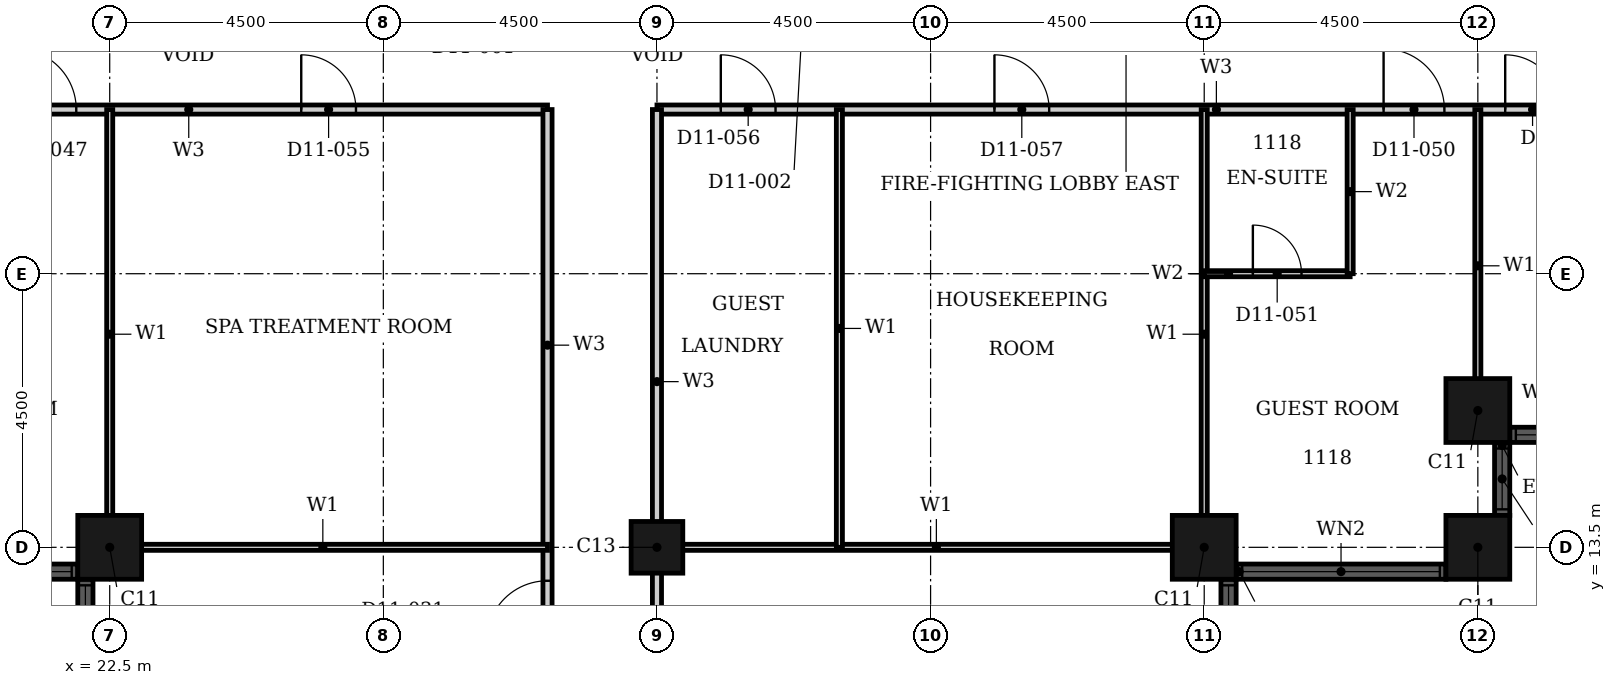
"""IFC4 building model, lengths in metres.
Left out: names, types, materials, properties, quantities, classifications, styles, units other than length and angle.
Written with IfcOpenShell. Run it as: python <this file> out.ifc"""

import sys

from ifc_helpers import new_model, si_unit, direction, frame, frame_2d, origin, origin_2d, place, context, subcontext, project, spatial, rectangle, hollow_rectangle, extrude, element, fill, save


model = new_model("IFC4")
c1 = context("Model", 3, precision=1e-05, world=origin(), true_north=direction((0.0, 1.0)))
c2 = subcontext(c1, "Body", "Model", "MODEL_VIEW")
j1 = project(units=[si_unit("LENGTHUNIT", "METRE"), si_unit("PLANEANGLEUNIT", "RADIAN")], contexts=[c1])
p1 = place(None, origin())
s1 = spatial("IfcSite", under=j1, at=p1, CompositionType="ELEMENT")
p2 = place(p1, origin())
s2 = spatial("IfcBuilding", under=s1, at=p2, CompositionType="ELEMENT")
p3 = place(p2, frame((0.0, 0.0, 52.8)))
s3 = spatial("IfcBuildingStorey", under=s2, at=p3, CompositionType="ELEMENT", Elevation=52.8)
for number, where, z_axis, x_axis in (
    (1, (40.5, 13.5, 0.0), (0.0, 0.0, 1.0), (1.0, 0.0, 0.0)),
    (2, (45.0, 13.5, 0.0), (0.0, 0.0, 1.0), (1.0, 0.0, 0.0)),
    (3, (45.0, 15.75, 0.0), (0.0, 0.0, 1.0), (1.0, 0.0, 0.0)),
    (4, (22.5, 13.5, 0.0), (0.0, 0.0, 1.0), (1.0, 0.0, 0.0)),
):
    element("IfcColumn", number, at=place(p3, frame(where, z_axis=z_axis, x_axis=x_axis)), inside=s3, PredefinedType="COLUMN", context=c2, shape_type="SweptSolid", body=[
        extrude(hollow_rectangle(XDim=1.05, YDim=1.05, WallThickness=0.034, at=origin_2d()), origin(), (0.0, 0.0, 1.0), 3.6),
    ])
p4 = place(p3, frame((31.5, 13.5, 0.0), z_axis=(0.0, 0.0, 1.0), x_axis=(1.0, 0.0, 0.0)))
e5 = element("IfcColumn", 5, at=p4, inside=s3, PredefinedType="COLUMN", context=c2, shape_type="SweptSolid", body=[
    extrude(hollow_rectangle(XDim=0.85, YDim=0.85, WallThickness=0.026, at=origin_2d()), origin(), (0.0, 0.0, 1.0), 3.6),
])
p5 = place(p3, frame((40.9, 5.025, 0.0), z_axis=(0.0, 0.0, 1.0), x_axis=(0.0, 1.0, 0.0)))
e6 = element("IfcWall", 6, at=p5, inside=s3, PredefinedType="SOLIDWALL", context=c2, shape_type="SweptSolid", body=[
    extrude(rectangle(XDim=7.95, YDim=0.25, at=frame_2d((3.975, 0.0))), origin(), (0.0, 0.0, 1.0), 3.6),
])
p6 = place(p5, frame((0.1, 0.0, 0.9)))
e7 = element("IfcOpeningElement", 7, at=p6, cuts=e6, PredefinedType="OPENING", context=c2, shape_type="SweptSolid", body=[
    extrude(rectangle(XDim=3.25, YDim=2.08, at=frame_2d((1.625, 1.04))), frame((0.0, 0.135, 0.0), z_axis=(0.0, -1.0, 0.0), x_axis=(1.0, 0.0, 0.0)), (0.0, 0.0, 1.0), 0.27),
])
p7 = place(p5, frame((4.6, 0.0, 0.9)))
e8 = element("IfcOpeningElement", 8, at=p7, cuts=e6, PredefinedType="OPENING", context=c2, shape_type="SweptSolid", body=[
    extrude(rectangle(XDim=3.25, YDim=2.08, at=frame_2d((1.625, 1.04))), frame((0.0, 0.135, 0.0), z_axis=(0.0, -1.0, 0.0), x_axis=(1.0, 0.0, 0.0)), (0.0, 0.0, 1.0), 0.27),
])
p8 = place(p3, frame((41.025, 13.1, 0.0), z_axis=(0.0, 0.0, 1.0), x_axis=(1.0, 0.0, 0.0)))
e9 = element("IfcWall", 9, at=p8, inside=s3, PredefinedType="SOLIDWALL", context=c2, shape_type="SweptSolid", body=[
    extrude(rectangle(XDim=3.45, YDim=0.25, at=frame_2d((1.725, 0.0))), origin(), (0.0, 0.0, 1.0), 3.6),
])
p9 = place(p8, frame((0.1, 0.0, 0.9)))
e10 = element("IfcOpeningElement", 10, at=p9, cuts=e9, PredefinedType="OPENING", context=c2, shape_type="SweptSolid", body=[
    extrude(rectangle(XDim=3.25, YDim=2.08, at=frame_2d((1.625, 1.04))), frame((0.0, 0.135, 0.0), z_axis=(0.0, -1.0, 0.0), x_axis=(1.0, 0.0, 0.0)), (0.0, 0.0, 1.0), 0.27),
])
p10 = place(p3, frame((45.4, 14.025, 0.0), z_axis=(0.0, 0.0, 1.0), x_axis=(0.0, 1.0, 0.0)))
e11 = element("IfcWall", 11, at=p10, inside=s3, PredefinedType="SOLIDWALL", context=c2, shape_type="SweptSolid", body=[
    extrude(rectangle(XDim=1.2, YDim=0.25, at=frame_2d((0.6, 0.0))), origin(), (0.0, 0.0, 1.0), 3.6),
])
p11 = place(p10, frame((0.1, 0.0, 0.9)))
e12 = element("IfcOpeningElement", 12, at=p11, cuts=e11, PredefinedType="OPENING", context=c2, shape_type="SweptSolid", body=[
    extrude(rectangle(XDim=1.0, YDim=2.08, at=frame_2d((0.5, 1.04))), frame((0.0, 0.135, 0.0), z_axis=(0.0, -1.0, 0.0), x_axis=(1.0, 0.0, 0.0)), (0.0, 0.0, 1.0), 0.27),
])
p12 = place(p3, frame((45.525, 15.35, 0.0), z_axis=(0.0, 0.0, 1.0), x_axis=(1.0, 0.0, 0.0)))
e13 = element("IfcWall", 13, at=p12, inside=s3, PredefinedType="SOLIDWALL", context=c2, shape_type="SweptSolid", body=[
    extrude(rectangle(XDim=1.2, YDim=0.25, at=frame_2d((0.6, 0.0))), origin(), (0.0, 0.0, 1.0), 3.6),
])
p13 = place(p12, frame((0.1, 0.0, 0.9)))
e14 = element("IfcOpeningElement", 14, at=p13, cuts=e13, PredefinedType="OPENING", context=c2, shape_type="SweptSolid", body=[
    extrude(rectangle(XDim=1.0, YDim=2.08, at=frame_2d((0.5, 1.04))), frame((0.0, 0.135, 0.0), z_axis=(0.0, -1.0, 0.0), x_axis=(1.0, 0.0, 0.0)), (0.0, 0.0, 1.0), 0.27),
])
p14 = place(p3, frame((18.525, 13.1, 0.0), z_axis=(0.0, 0.0, 1.0), x_axis=(1.0, 0.0, 0.0)))
e15 = element("IfcWall", 15, at=p14, inside=s3, PredefinedType="SOLIDWALL", context=c2, shape_type="SweptSolid", body=[
    extrude(rectangle(XDim=3.45, YDim=0.25, at=frame_2d((1.725, 0.0))), origin(), (0.0, 0.0, 1.0), 3.6),
])
p15 = place(p14, frame((0.1, 0.0, 0.9)))
e16 = element("IfcOpeningElement", 16, at=p15, cuts=e15, PredefinedType="OPENING", context=c2, shape_type="SweptSolid", body=[
    extrude(rectangle(XDim=3.25, YDim=2.08, at=frame_2d((1.625, 1.04))), frame((0.0, 0.135, 0.0), z_axis=(0.0, -1.0, 0.0), x_axis=(1.0, 0.0, 0.0)), (0.0, 0.0, 1.0), 0.27),
])
p16 = place(p3, frame((22.1, 12.975, 0.0), z_axis=(0.0, 0.0, 1.0), x_axis=(0.0, -1.0, 0.0)))
e17 = element("IfcWall", 17, at=p16, inside=s3, PredefinedType="SOLIDWALL", context=c2, shape_type="SweptSolid", body=[
    extrude(rectangle(XDim=7.95, YDim=0.25, at=frame_2d((3.975, 0.0))), origin(), (0.0, 0.0, 1.0), 3.6),
])
p17 = place(p16, frame((0.1, 0.0, 0.9)))
e18 = element("IfcOpeningElement", 18, at=p17, cuts=e17, PredefinedType="OPENING", context=c2, shape_type="SweptSolid", body=[
    extrude(rectangle(XDim=3.25, YDim=2.08, at=frame_2d((1.625, 1.04))), frame((0.0, 0.135, 0.0), z_axis=(0.0, -1.0, 0.0), x_axis=(1.0, 0.0, 0.0)), (0.0, 0.0, 1.0), 0.27),
])
p18 = place(p16, frame((4.6, 0.0, 0.9)))
e19 = element("IfcOpeningElement", 19, at=p18, cuts=e17, PredefinedType="OPENING", context=c2, shape_type="SweptSolid", body=[
    extrude(rectangle(XDim=3.25, YDim=2.08, at=frame_2d((1.625, 1.04))), frame((0.0, 0.135, 0.0), z_axis=(0.0, -1.0, 0.0), x_axis=(1.0, 0.0, 0.0)), (0.0, 0.0, 1.0), 0.27),
])
p19 = place(p3, frame((31.5, 20.7, 0.0), z_axis=(0.0, 0.0, 1.0), x_axis=(1.0, 0.0, 0.0)))
e20 = element("IfcWall", 20, at=p19, inside=s3, PredefinedType="PARTITIONING", context=c2, shape_type="SweptSolid", body=[
    extrude(rectangle(XDim=15.3, YDim=0.15, at=frame_2d((7.65, 0.0))), origin(), (0.0, 0.0, 1.0), 3.3),
])
p20 = place(p19, frame((11.95, 0.0, 0.0)))
e21 = element("IfcOpeningElement", 21, at=p20, cuts=e20, PredefinedType="OPENING", context=c2, shape_type="SweptSolid", body=[
    extrude(rectangle(XDim=1.0, YDim=2.1, at=frame_2d((0.5, 1.05))), frame((0.0, 0.085, 0.0), z_axis=(0.0, -1.0, 0.0), x_axis=(1.0, 0.0, 0.0)), (0.0, 0.0, 1.0), 0.17),
])
p21 = place(p19, frame((13.95, 0.0, 0.0)))
e22 = element("IfcOpeningElement", 22, at=p21, cuts=e20, PredefinedType="OPENING", context=c2, shape_type="SweptSolid", body=[
    extrude(rectangle(XDim=0.9, YDim=2.1, at=frame_2d((0.45, 1.05))), frame((0.0, 0.085, 0.0), z_axis=(0.0, -1.0, 0.0), x_axis=(1.0, 0.0, 0.0)), (0.0, 0.0, 1.0), 0.17),
])
p22 = place(p19, frame((1.05, 0.0, 0.0)))
e23 = element("IfcOpeningElement", 23, at=p22, cuts=e20, PredefinedType="OPENING", context=c2, shape_type="SweptSolid", body=[
    extrude(rectangle(XDim=0.9, YDim=2.1, at=frame_2d((0.45, 1.05))), frame((0.0, 0.085, 0.0), z_axis=(0.0, -1.0, 0.0), x_axis=(1.0, 0.0, 0.0)), (0.0, 0.0, 1.0), 0.17),
])
p23 = place(p19, frame((5.55, 0.0, 0.0)))
e24 = element("IfcOpeningElement", 24, at=p23, cuts=e20, PredefinedType="OPENING", context=c2, shape_type="SweptSolid", body=[
    extrude(rectangle(XDim=0.9, YDim=2.1, at=frame_2d((0.45, 1.05))), frame((0.0, 0.085, 0.0), z_axis=(0.0, -1.0, 0.0), x_axis=(1.0, 0.0, 0.0)), (0.0, 0.0, 1.0), 0.17),
])
p24 = place(p3, frame((16.2, 20.7, 0.0), z_axis=(0.0, 0.0, 1.0), x_axis=(1.0, 0.0, 0.0)))
e25 = element("IfcWall", 25, at=p24, inside=s3, PredefinedType="PARTITIONING", context=c2, shape_type="SweptSolid", body=[
    extrude(rectangle(XDim=13.5, YDim=0.15, at=frame_2d((6.75, 0.0))), origin(), (0.0, 0.0, 1.0), 3.3),
])
p25 = place(p24, frame((4.75, 0.0, 0.0)))
e26 = element("IfcOpeningElement", 26, at=p25, cuts=e25, PredefinedType="OPENING", context=c2, shape_type="SweptSolid", body=[
    extrude(rectangle(XDim=1.0, YDim=2.1, at=frame_2d((0.5, 1.05))), frame((0.0, 0.085, 0.0), z_axis=(0.0, -1.0, 0.0), x_axis=(1.0, 0.0, 0.0)), (0.0, 0.0, 1.0), 0.17),
])
p26 = place(p24, frame((0.45, 0.0, 0.0)))
e27 = element("IfcOpeningElement", 27, at=p26, cuts=e25, PredefinedType="OPENING", context=c2, shape_type="SweptSolid", body=[
    extrude(rectangle(XDim=0.9, YDim=2.1, at=frame_2d((0.45, 1.05))), frame((0.0, 0.085, 0.0), z_axis=(0.0, -1.0, 0.0), x_axis=(1.0, 0.0, 0.0)), (0.0, 0.0, 1.0), 0.17),
])
p27 = place(p24, frame((9.45, 0.0, 0.0)))
e28 = element("IfcOpeningElement", 28, at=p27, cuts=e25, PredefinedType="OPENING", context=c2, shape_type="SweptSolid", body=[
    extrude(rectangle(XDim=0.9, YDim=2.1, at=frame_2d((0.45, 1.05))), frame((0.0, 0.085, 0.0), z_axis=(0.0, -1.0, 0.0), x_axis=(1.0, 0.0, 0.0)), (0.0, 0.0, 1.0), 0.17),
])
p28 = place(p3, frame((29.7, 4.5, 0.0), z_axis=(0.0, 0.0, 1.0), x_axis=(0.0, 1.0, 0.0)))
e29 = element("IfcWall", 29, at=p28, inside=s3, PredefinedType="PARTITIONING", context=c2, shape_type="SweptSolid", body=[
    extrude(rectangle(XDim=16.2, YDim=0.15, at=frame_2d((8.1, 0.0))), origin(), (0.0, 0.0, 1.0), 3.3),
])
p29 = place(p28, frame((7.45, 0.0, 0.0)))
e30 = element("IfcOpeningElement", 30, at=p29, cuts=e29, PredefinedType="OPENING", context=c2, shape_type="SweptSolid", body=[
    extrude(rectangle(XDim=1.0, YDim=2.1, at=frame_2d((0.5, 1.05))), frame((0.0, 0.085, 0.0), z_axis=(0.0, -1.0, 0.0), x_axis=(1.0, 0.0, 0.0)), (0.0, 0.0, 1.0), 0.17),
])
p30 = place(p28, frame((2.95, 0.0, 0.0)))
e31 = element("IfcOpeningElement", 31, at=p30, cuts=e29, PredefinedType="OPENING", context=c2, shape_type="SweptSolid", body=[
    extrude(rectangle(XDim=1.0, YDim=2.1, at=frame_2d((0.5, 1.05))), frame((0.0, 0.085, 0.0), z_axis=(0.0, -1.0, 0.0), x_axis=(1.0, 0.0, 0.0)), (0.0, 0.0, 1.0), 0.17),
])
p31 = place(p3, frame((31.5, 4.5, 0.0), z_axis=(0.0, 0.0, 1.0), x_axis=(0.0, 1.0, 0.0)))
e32 = element("IfcWall", 32, at=p31, inside=s3, PredefinedType="PARTITIONING", context=c2, shape_type="SweptSolid", body=[
    extrude(rectangle(XDim=16.2, YDim=0.15, at=frame_2d((8.1, 0.0))), origin(), (0.0, 0.0, 1.0), 2.58),
])
p32 = place(p31, frame((6.25, 0.0, 0.0)))
e33 = element("IfcOpeningElement", 33, at=p32, cuts=e32, PredefinedType="OPENING", context=c2, shape_type="SweptSolid", body=[
    extrude(rectangle(XDim=1.0, YDim=2.1, at=frame_2d((0.5, 1.05))), frame((0.0, 0.085, 0.0), z_axis=(0.0, -1.0, 0.0), x_axis=(1.0, 0.0, 0.0)), (0.0, 0.0, 1.0), 0.17),
])
p33 = place(p3, frame((22.31, 13.5, 0.0), z_axis=(0.0, 0.0, 1.0), x_axis=(1.0, 0.0, 0.0)))
e34 = element("IfcWall", 34, at=p33, inside=s3, PredefinedType="PARTITIONING", context=c2, shape_type="SweptSolid", body=[
    extrude(rectangle(XDim=7.39, YDim=0.1, at=frame_2d((3.695, 0.0))), origin(), (0.0, 0.0, 1.0), 2.38),
])
p34 = place(p3, frame((31.5, 13.5, 0.0), z_axis=(0.0, 0.0, 1.0), x_axis=(1.0, 0.0, 0.0)))
e35 = element("IfcWall", 35, at=p34, inside=s3, PredefinedType="PARTITIONING", context=c2, shape_type="SweptSolid", body=[
    extrude(rectangle(XDim=9.19, YDim=0.1, at=frame_2d((4.595, 0.0))), origin(), (0.0, 0.0, 1.0), 2.38),
])
p35 = place(p3, frame((22.5, 13.31, 0.0), z_axis=(0.0, 0.0, 1.0), x_axis=(0.0, 1.0, 0.0)))
e36 = element("IfcWall", 36, at=p35, inside=s3, PredefinedType="PARTITIONING", context=c2, shape_type="SweptSolid", body=[
    extrude(rectangle(XDim=7.39, YDim=0.1, at=frame_2d((3.695, 0.0))), origin(), (0.0, 0.0, 1.0), 3.3),
])
p36 = place(p3, frame((34.5, 13.5, 0.0), z_axis=(0.0, 0.0, 1.0), x_axis=(0.0, 1.0, 0.0)))
e37 = element("IfcWall", 37, at=p36, inside=s3, PredefinedType="PARTITIONING", context=c2, shape_type="SweptSolid", body=[
    extrude(rectangle(XDim=7.2, YDim=0.1, at=frame_2d((3.6, 0.0))), origin(), (0.0, 0.0, 1.0), 3.3),
])
p37 = place(p3, frame((40.5, 13.31, 0.0), z_axis=(0.0, 0.0, 1.0), x_axis=(0.0, 1.0, 0.0)))
e38 = element("IfcWall", 38, at=p37, inside=s3, PredefinedType="PARTITIONING", context=c2, shape_type="SweptSolid", body=[
    extrude(rectangle(XDim=7.39, YDim=0.1, at=frame_2d((3.695, 0.0))), origin(), (0.0, 0.0, 1.0), 3.3),
])
p38 = place(p3, frame((45.0, 15.56, 0.0), z_axis=(0.0, 0.0, 1.0), x_axis=(0.0, 1.0, 0.0)))
e39 = element("IfcWall", 39, at=p38, inside=s3, PredefinedType="PARTITIONING", context=c2, shape_type="SweptSolid", body=[
    extrude(rectangle(XDim=5.14, YDim=0.1, at=frame_2d((2.57, 0.0))), origin(), (0.0, 0.0, 1.0), 3.3),
])
p39 = place(p3, frame((40.5, 18.0, 0.0), z_axis=(0.0, 0.0, 1.0), x_axis=(1.0, 0.0, 0.0)))
e40 = element("IfcWall", 40, at=p39, inside=s3, PredefinedType="PARTITIONING", context=c2, shape_type="SweptSolid", body=[
    extrude(rectangle(XDim=2.4, YDim=0.1, at=frame_2d((1.2, 0.0))), origin(), (0.0, 0.0, 1.0), 3.3),
])
p40 = place(p39, frame((0.8, 0.0, 0.0)))
e41 = element("IfcOpeningElement", 41, at=p40, cuts=e40, PredefinedType="OPENING", context=c2, shape_type="SweptSolid", body=[
    extrude(rectangle(XDim=0.8, YDim=2.1, at=frame_2d((0.4, 1.05))), frame((0.0, 0.06, 0.0), z_axis=(0.0, -1.0, 0.0), x_axis=(1.0, 0.0, 0.0)), (0.0, 0.0, 1.0), 0.12),
])
p41 = place(p3, frame((42.9, 18.0, 0.0), z_axis=(0.0, 0.0, 1.0), x_axis=(0.0, 1.0, 0.0)))
e42 = element("IfcWall", 42, at=p41, inside=s3, PredefinedType="PARTITIONING", context=c2, shape_type="SweptSolid", body=[
    extrude(rectangle(XDim=2.7, YDim=0.1, at=frame_2d((1.35, 0.0))), origin(), (0.0, 0.0, 1.0), 3.3),
])
p42 = place(p7, origin())
e43 = element("IfcWindow", 43, at=p42, inside=s3, PartitioningType="SINGLE_PANEL", PredefinedType="WINDOW", context=c2, shape_type="SweptSolid", body=[
    extrude(rectangle(XDim=3.25, YDim=2.08, at=frame_2d((1.625, 1.04))), frame((0.0, 0.03, 0.0), z_axis=(0.0, -1.0, 0.0), x_axis=(1.0, 0.0, 0.0)), (0.0, 0.0, 1.0), 0.06),
])
fill(e8, e43)
p43 = place(p9, origin())
e44 = element("IfcWindow", 44, at=p43, inside=s3, PartitioningType="SINGLE_PANEL", PredefinedType="WINDOW", context=c2, shape_type="SweptSolid", body=[
    extrude(rectangle(XDim=3.25, YDim=2.08, at=frame_2d((1.625, 1.04))), frame((0.0, 0.03, 0.0), z_axis=(0.0, -1.0, 0.0), x_axis=(1.0, 0.0, 0.0)), (0.0, 0.0, 1.0), 0.06),
])
fill(e10, e44)
p44 = place(p11, origin())
e45 = element("IfcWindow", 45, at=p44, inside=s3, PartitioningType="SINGLE_PANEL", PredefinedType="WINDOW", context=c2, shape_type="SweptSolid", body=[
    extrude(rectangle(XDim=1.0, YDim=2.08, at=frame_2d((0.5, 1.04))), frame((0.0, 0.03, 0.0), z_axis=(0.0, -1.0, 0.0), x_axis=(1.0, 0.0, 0.0)), (0.0, 0.0, 1.0), 0.06),
])
fill(e12, e45)
p45 = place(p13, origin())
e46 = element("IfcWindow", 46, at=p45, inside=s3, PartitioningType="SINGLE_PANEL", PredefinedType="WINDOW", context=c2, shape_type="SweptSolid", body=[
    extrude(rectangle(XDim=1.0, YDim=2.08, at=frame_2d((0.5, 1.04))), frame((0.0, 0.03, 0.0), z_axis=(0.0, -1.0, 0.0), x_axis=(1.0, 0.0, 0.0)), (0.0, 0.0, 1.0), 0.06),
])
fill(e14, e46)
p46 = place(p15, origin())
e47 = element("IfcWindow", 47, at=p46, inside=s3, PartitioningType="SINGLE_PANEL", PredefinedType="WINDOW", context=c2, shape_type="SweptSolid", body=[
    extrude(rectangle(XDim=3.25, YDim=2.08, at=frame_2d((1.625, 1.04))), frame((0.0, 0.03, 0.0), z_axis=(0.0, -1.0, 0.0), x_axis=(1.0, 0.0, 0.0)), (0.0, 0.0, 1.0), 0.06),
])
fill(e16, e47)
p47 = place(p17, origin())
e48 = element("IfcWindow", 48, at=p47, inside=s3, PartitioningType="SINGLE_PANEL", PredefinedType="WINDOW", context=c2, shape_type="SweptSolid", body=[
    extrude(rectangle(XDim=3.25, YDim=2.08, at=frame_2d((1.625, 1.04))), frame((0.0, 0.03, 0.0), z_axis=(0.0, -1.0, 0.0), x_axis=(1.0, 0.0, 0.0)), (0.0, 0.0, 1.0), 0.06),
])
fill(e18, e48)
p48 = place(p29, origin())
e49 = element("IfcDoor", 49, at=p48, inside=s3, OperationType="SINGLE_SWING_RIGHT", PredefinedType="DOOR", context=c2, shape_type="SweptSolid", body=[
    extrude(rectangle(XDim=1.0, YDim=2.1, at=frame_2d((0.5, 1.05))), frame((0.0, 0.025, 0.0), z_axis=(0.0, -1.0, 0.0), x_axis=(1.0, 0.0, 0.0)), (0.0, 0.0, 1.0), 0.05),
])
fill(e30, e49)
p49 = place(p25, origin())
e50 = element("IfcDoor", 50, at=p49, inside=s3, OperationType="SINGLE_SWING_RIGHT", PredefinedType="DOOR", context=c2, shape_type="SweptSolid", body=[
    extrude(rectangle(XDim=1.0, YDim=2.1, at=frame_2d((0.5, 1.05))), frame((0.0, 0.025, 0.0), z_axis=(0.0, -1.0, 0.0), x_axis=(1.0, 0.0, 0.0)), (0.0, 0.0, 1.0), 0.05),
])
fill(e26, e50)
p50 = place(p20, origin())
e51 = element("IfcDoor", 51, at=p50, inside=s3, OperationType="SINGLE_SWING_RIGHT", PredefinedType="DOOR", context=c2, shape_type="SweptSolid", body=[
    extrude(rectangle(XDim=1.0, YDim=2.1, at=frame_2d((0.5, 1.05))), frame((0.0, 0.025, 0.0), z_axis=(0.0, -1.0, 0.0), x_axis=(1.0, 0.0, 0.0)), (0.0, 0.0, 1.0), 0.05),
])
fill(e21, e51)
p51 = place(p40, origin())
e52 = element("IfcDoor", 52, at=p51, inside=s3, OperationType="SINGLE_SWING_LEFT", PredefinedType="DOOR", context=c2, shape_type="SweptSolid", body=[
    extrude(rectangle(XDim=0.8, YDim=2.1, at=frame_2d((0.4, 1.05))), frame((0.0, 0.025, 0.0), z_axis=(0.0, -1.0, 0.0), x_axis=(1.0, 0.0, 0.0)), (0.0, 0.0, 1.0), 0.05),
])
fill(e41, e52)
p52 = place(p21, origin())
e53 = element("IfcDoor", 53, at=p52, inside=s3, OperationType="SINGLE_SWING_RIGHT", PredefinedType="DOOR", context=c2, shape_type="SweptSolid", body=[
    extrude(rectangle(XDim=0.9, YDim=2.1, at=frame_2d((0.45, 1.05))), frame((0.0, 0.025, 0.0), z_axis=(0.0, -1.0, 0.0), x_axis=(1.0, 0.0, 0.0)), (0.0, 0.0, 1.0), 0.05),
])
fill(e22, e53)
p53 = place(p27, origin())
e54 = element("IfcDoor", 54, at=p53, inside=s3, OperationType="SINGLE_SWING_RIGHT", PredefinedType="DOOR", context=c2, shape_type="SweptSolid", body=[
    extrude(rectangle(XDim=0.9, YDim=2.1, at=frame_2d((0.45, 1.05))), frame((0.0, 0.025, 0.0), z_axis=(0.0, -1.0, 0.0), x_axis=(1.0, 0.0, 0.0)), (0.0, 0.0, 1.0), 0.05),
])
fill(e28, e54)
p54 = place(p22, origin())
e55 = element("IfcDoor", 55, at=p54, inside=s3, OperationType="SINGLE_SWING_LEFT", PredefinedType="DOOR", context=c2, shape_type="SweptSolid", body=[
    extrude(rectangle(XDim=0.9, YDim=2.1, at=frame_2d((0.45, 1.05))), frame((0.0, 0.025, 0.0), z_axis=(0.0, -1.0, 0.0), x_axis=(1.0, 0.0, 0.0)), (0.0, 0.0, 1.0), 0.05),
])
fill(e23, e55)
p55 = place(p23, origin())
e56 = element("IfcDoor", 56, at=p55, inside=s3, OperationType="SINGLE_SWING_RIGHT", PredefinedType="DOOR", context=c2, shape_type="SweptSolid", body=[
    extrude(rectangle(XDim=0.9, YDim=2.1, at=frame_2d((0.45, 1.05))), frame((0.0, 0.025, 0.0), z_axis=(0.0, -1.0, 0.0), x_axis=(1.0, 0.0, 0.0)), (0.0, 0.0, 1.0), 0.05),
])
fill(e24, e56)
save(model, sys.argv[1])
